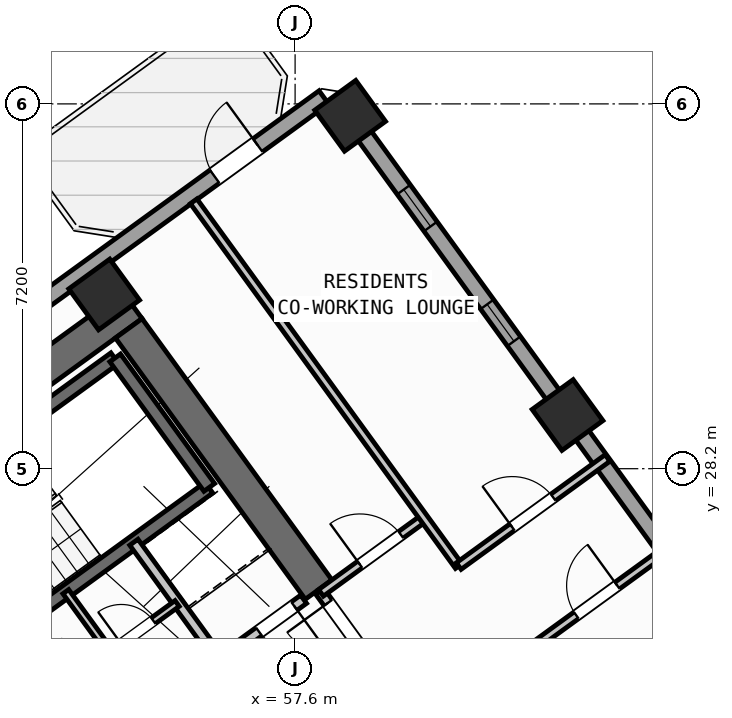
"""IFC4 building model, lengths in metres.
Left out: names, types, materials, properties, quantities, classifications, styles, units other than length and angle.
Written with IfcOpenShell. Run it as: python <this file> out.ifc"""

import sys

from ifc_helpers import new_model, si_unit, direction, frame, frame_2d, origin, origin_2d, place, context, subcontext, project, spatial, rectangle, hollow_rectangle, extrude, source, transform, mapped, element, fill, save


model = new_model("IFC4")
c1 = context("Model", 3, precision=1e-05, world=origin(), true_north=direction((0.0, 1.0)))
c2 = subcontext(c1, "Body", "Model", "MODEL_VIEW")
j1 = project(units=[si_unit("LENGTHUNIT", "METRE"), si_unit("PLANEANGLEUNIT", "RADIAN")], contexts=[c1])
p1 = place(None, origin())
s1 = spatial("IfcSite", under=j1, at=p1, CompositionType="ELEMENT")
p2 = place(p1, origin())
s2 = spatial("IfcBuilding", under=s1, at=p2, CompositionType="ELEMENT")
p3 = place(p2, frame((0.0, 0.0, 67.2)))
s3 = spatial("IfcBuildingStorey", under=s2, at=p3, CompositionType="ELEMENT", Elevation=67.2)
p4 = place(p3, frame((44.325, 24.113, 0.0), z_axis=(0.0, 0.0, 1.0), x_axis=(0.809012664862, 0.58779121131, 0.0)))
e1 = element("IfcWall", 1, at=p4, inside=s3, PredefinedType="SHEAR", context=c2, shape_type="SweptSolid", body=[
    extrude(rectangle(XDim=12.44, YDim=0.65, at=frame_2d((6.22, 0.0))), origin(), (0.0, 0.0, 1.0), 4.22),
])
p5 = place(p3, frame((58.064, 25.813, 0.0), z_axis=(0.0, 0.0, 1.0), x_axis=(-0.58777996584, 0.809020835181, 0.0)))
e2 = element("IfcWall", 2, at=p5, inside=s3, PredefinedType="SHEAR", context=c2, shape_type="SweptSolid", body=[
    extrude(rectangle(XDim=6.375, YDim=0.65, at=frame_2d((3.188, 0.0))), origin(), (0.0, 0.0, 1.0), 4.22),
])
m1 = source(origin(), c2, "Body", "SweptSolid", [
    extrude(hollow_rectangle(XDim=1.0, YDim=1.0, WallThickness=0.04, at=origin_2d()), origin(), (0.0, 0.0, 1.0), 4.5),
])
for number, where, z_axis, x_axis in (
    (3, (53.832, 31.638, 0.0), (0.0, 0.0, 1.0), (0.809, 0.588, 0.0)),
    (4, (62.977, 29.259, 0.0), (0.0, 0.0, 1.0), (0.809, 0.588, 0.0)),
    (5, (58.686, 35.165, 0.0), (0.0, 0.0, 1.0), (0.809, 0.588, 0.0)),
):
    element("IfcColumn", number, at=place(p3, frame(where, z_axis=z_axis, x_axis=x_axis)), inside=s3, PredefinedType="COLUMN", context=c2, shape_type="MappedRepresentation", body=[
        mapped(m1, transform((0.0, 0.0, 0.0), scale=1.0)),
    ])
p6 = place(p3, frame((43.938, 25.192, 0.0), z_axis=(0.0, 0.0, 1.0), x_axis=(0.809016324578, 0.587786174187, 0.0)))
e6 = element("IfcWall", 6, at=p6, inside=s3, PredefinedType="STANDARD", context=c2, shape_type="SweptSolid", body=[
    extrude(rectangle(XDim=17.587, YDim=0.32, at=frame_2d((8.794, 0.0))), origin(), (0.0, 0.0, 1.0), 4.22),
])
p7 = place(p6, frame((14.926, 0.0, 0.0)))
e7 = element("IfcOpeningElement", 7, at=p7, cuts=e6, PredefinedType="OPENING", context=c2, shape_type="SweptSolid", body=[
    extrude(rectangle(XDim=1.05, YDim=2.15, at=frame_2d((0.525, 1.075))), frame((0.0, 0.17, 0.0), z_axis=(0.0, -1.0, 0.0), x_axis=(1.0, 0.0, 0.0)), (0.0, 0.0, 1.0), 0.34),
])
p8 = place(p6, frame((2.606, 0.0, 0.8)))
e8 = element("IfcOpeningElement", 8, at=p8, cuts=e6, PredefinedType="OPENING", context=c2, shape_type="SweptSolid", body=[
    extrude(rectangle(XDim=2.1, YDim=1.55, at=frame_2d((1.05, 0.775))), frame((0.0, 0.17, 0.0), z_axis=(0.0, -1.0, 0.0), x_axis=(1.0, 0.0, 0.0)), (0.0, 0.0, 1.0), 0.34),
])
p9 = place(p6, frame((6.881, 0.0, 0.8)))
e9 = element("IfcOpeningElement", 9, at=p9, cuts=e6, PredefinedType="OPENING", context=c2, shape_type="SweptSolid", body=[
    extrude(rectangle(XDim=2.1, YDim=1.55, at=frame_2d((1.05, 0.775))), frame((0.0, 0.17, 0.0), z_axis=(0.0, -1.0, 0.0), x_axis=(1.0, 0.0, 0.0)), (0.0, 0.0, 1.0), 0.34),
])
p10 = place(p3, frame((58.455, 35.484, 0.0), z_axis=(0.0, 0.0, 1.0), x_axis=(0.587783625747, -0.809018176127, 0.0)))
e10 = element("IfcWall", 10, at=p10, inside=s3, PredefinedType="STANDARD", context=c2, shape_type="SweptSolid", body=[
    extrude(rectangle(XDim=21.587, YDim=0.32, at=frame_2d((10.794, 0.0))), origin(), (0.0, 0.0, 1.0), 2.395),
])
p11 = place(p10, frame((2.194, 0.0, 1.0)))
e11 = element("IfcOpeningElement", 11, at=p11, cuts=e10, PredefinedType="OPENING", context=c2, shape_type="SweptSolid", body=[
    extrude(rectangle(XDim=0.9, YDim=1.25, at=frame_2d((0.45, 0.625))), frame((0.0, 0.17, 0.0), z_axis=(0.0, -1.0, 0.0), x_axis=(1.0, 0.0, 0.0)), (0.0, 0.0, 1.0), 0.34),
])
p12 = place(p10, frame((4.994, 0.0, 1.0)))
e12 = element("IfcOpeningElement", 12, at=p12, cuts=e10, PredefinedType="OPENING", context=c2, shape_type="SweptSolid", body=[
    extrude(rectangle(XDim=0.9, YDim=1.25, at=frame_2d((0.45, 0.625))), frame((0.0, 0.17, 0.0), z_axis=(0.0, -1.0, 0.0), x_axis=(1.0, 0.0, 0.0)), (0.0, 0.0, 1.0), 0.34),
])
p13 = place(p10, frame((12.384, 0.0, 1.0)))
e13 = element("IfcOpeningElement", 13, at=p13, cuts=e10, PredefinedType="OPENING", context=c2, shape_type="SweptSolid", body=[
    extrude(rectangle(XDim=0.9, YDim=1.25, at=frame_2d((0.45, 0.625))), frame((0.0, 0.17, 0.0), z_axis=(0.0, -1.0, 0.0), x_axis=(1.0, 0.0, 0.0)), (0.0, 0.0, 1.0), 0.34),
])
p14 = place(p10, frame((18.835, 0.0, 1.0)))
e14 = element("IfcOpeningElement", 14, at=p14, cuts=e10, PredefinedType="OPENING", context=c2, shape_type="SweptSolid", body=[
    extrude(rectangle(XDim=0.9, YDim=1.25, at=frame_2d((0.45, 0.625))), frame((0.0, 0.17, 0.0), z_axis=(0.0, -1.0, 0.0), x_axis=(1.0, 0.0, 0.0)), (0.0, 0.0, 1.0), 0.34),
])
p15 = place(p3, frame((48.006, 25.996, 0.0), z_axis=(0.0, 0.0, 1.0), x_axis=(0.80901903764, 0.587782439969, 0.0)))
e15 = element("IfcWall", 15, at=p15, inside=s3, PredefinedType="SHEAR", context=c2, shape_type="SweptSolid", body=[
    extrude(rectangle(XDim=7.46, YDim=0.26, at=frame_2d((3.73, 0.0))), origin(), (0.0, 0.0, 1.0), 4.22),
])
p16 = place(p3, frame((49.863, 23.44, 0.0), z_axis=(0.0, 0.0, 1.0), x_axis=(0.809003474932, 0.587803859759, 0.0)))
e16 = element("IfcWall", 16, at=p16, inside=s3, PredefinedType="SHEAR", context=c2, shape_type="SweptSolid", body=[
    extrude(rectangle(XDim=7.46, YDim=0.26, at=frame_2d((3.73, 0.0))), origin(), (0.0, 0.0, 1.0), 4.22),
])
p17 = place(p16, frame((0.36, 0.0, 0.0)))
e17 = element("IfcOpeningElement", 17, at=p17, cuts=e16, PredefinedType="OPENING", context=c2, shape_type="SweptSolid", body=[
    extrude(rectangle(XDim=0.86, YDim=2.05, at=frame_2d((0.43, 1.025))), frame((0.0, 0.14, 0.0), z_axis=(0.0, -1.0, 0.0), x_axis=(1.0, 0.0, 0.0)), (0.0, 0.0, 1.0), 0.28),
])
p18 = place(p3, frame((55.906, 27.831, 0.0), z_axis=(0.0, 0.0, 1.0), x_axis=(-0.587804123638, 0.809003283204, 0.0)))
e18 = element("IfcWall", 18, at=p18, inside=s3, PredefinedType="SHEAR", context=c2, shape_type="SweptSolid", body=[
    extrude(rectangle(XDim=3.16, YDim=0.26, at=frame_2d((1.58, 0.0))), origin(), (0.0, 0.0, 1.0), 4.22),
])
p19 = place(p3, frame((56.111, 24.419, 0.0), z_axis=(0.0, 0.0, 1.0), x_axis=(-0.58777848983, 0.809021907548, 0.0)))
e19 = element("IfcWall", 19, at=p19, inside=s3, PredefinedType="STANDARD", context=c2, shape_type="SweptSolid", body=[
    extrude(rectangle(XDim=2.88, YDim=0.2, at=frame_2d((1.44, 0.0))), origin(), (0.0, 0.0, 1.0), 4.21),
])
p20 = place(p3, frame((53.425, 22.468, 0.0), z_axis=(0.0, 0.0, 1.0), x_axis=(0.80902705128, 0.587771409902, 0.0)))
e20 = element("IfcWall", 20, at=p20, inside=s3, PredefinedType="STANDARD", context=c2, shape_type="SweptSolid", body=[
    extrude(rectangle(XDim=5.368, YDim=0.2, at=frame_2d((2.684, 0.0))), origin(), (0.0, 0.0, 1.0), 4.21),
])
p21 = place(p20, frame((4.28, 0.0, 0.0)))
e21 = element("IfcOpeningElement", 21, at=p21, cuts=e20, PredefinedType="OPENING", context=c2, shape_type="SweptSolid", body=[
    extrude(rectangle(XDim=0.86, YDim=2.05, at=frame_2d((0.43, 1.025))), frame((0.0, 0.11, 0.0), z_axis=(0.0, -1.0, 0.0), x_axis=(1.0, 0.0, 0.0)), (0.0, 0.0, 1.0), 0.22),
])
p22 = place(p20, frame((0.35, 0.0, 0.0)))
e22 = element("IfcOpeningElement", 22, at=p22, cuts=e20, PredefinedType="OPENING", context=c2, shape_type="SweptSolid", body=[
    extrude(rectangle(XDim=0.86, YDim=2.05, at=frame_2d((0.43, 1.025))), frame((0.0, 0.11, 0.0), z_axis=(0.0, -1.0, 0.0), x_axis=(1.0, 0.0, 0.0)), (0.0, 0.0, 1.0), 0.22),
])
p23 = place(p3, frame((53.945, 24.576, 0.0), z_axis=(0.0, 0.0, 1.0), x_axis=(-0.587897037186, 0.808935766095, 0.0)))
e23 = element("IfcWall", 23, at=p23, inside=s3, PredefinedType="PLUMBINGWALL", context=c2, shape_type="SweptSolid", body=[
    extrude(rectangle(XDim=1.48, YDim=0.14, at=frame_2d((0.74, 0.0))), origin(), (0.0, 0.0, 1.0), 4.21),
])
p24 = place(p3, frame((52.618, 23.612, 0.0), z_axis=(0.0, 0.0, 1.0), x_axis=(0.809009587469, 0.587795446889, 0.0)))
e24 = element("IfcWall", 24, at=p24, inside=s3, PredefinedType="PLUMBINGWALL", context=c2, shape_type="SweptSolid", body=[
    extrude(rectangle(XDim=3.28, YDim=0.14, at=frame_2d((1.64, 0.0))), origin(), (0.0, 0.0, 1.0), 4.21),
])
p25 = place(p24, frame((0.25, 0.0, 0.0)))
e25 = element("IfcOpeningElement", 25, at=p25, cuts=e24, PredefinedType="OPENING", context=c2, shape_type="SweptSolid", body=[
    extrude(rectangle(XDim=0.78, YDim=2.05, at=frame_2d((0.39, 1.025))), frame((0.0, 0.08, 0.0), z_axis=(0.0, -1.0, 0.0), x_axis=(1.0, 0.0, 0.0)), (0.0, 0.0, 1.0), 0.16),
])
p26 = place(p24, frame((1.92, 0.0, 0.0)))
e26 = element("IfcOpeningElement", 26, at=p26, cuts=e24, PredefinedType="OPENING", context=c2, shape_type="SweptSolid", body=[
    extrude(rectangle(XDim=0.78, YDim=2.05, at=frame_2d((0.39, 1.025))), frame((0.0, 0.08, 0.0), z_axis=(0.0, -1.0, 0.0), x_axis=(1.0, 0.0, 0.0)), (0.0, 0.0, 1.0), 0.16),
])
p27 = place(p3, frame((59.827, 23.386, 0.0), z_axis=(0.0, 0.0, 1.0), x_axis=(-0.587803840107, 0.809003489211, 0.0)))
e27 = element("IfcWall", 27, at=p27, inside=s3, PredefinedType="STANDARD", context=c2, shape_type="SweptSolid", body=[
    extrude(rectangle(XDim=2.96, YDim=0.2, at=frame_2d((1.48, 0.0))), origin(), (0.0, 0.0, 1.0), 2.395),
])
p28 = place(p27, frame((1.68, 0.0, 0.0)))
e28 = element("IfcOpeningElement", 28, at=p28, cuts=e27, PredefinedType="OPENING", context=c2, shape_type="SweptSolid", body=[
    extrude(rectangle(XDim=1.0, YDim=2.1, at=frame_2d((0.5, 1.05))), frame((0.0, 0.11, 0.0), z_axis=(0.0, -1.0, 0.0), x_axis=(1.0, 0.0, 0.0)), (0.0, 0.0, 1.0), 0.22),
])
p29 = place(p3, frame((58.111, 25.749, 0.0), z_axis=(0.0, 0.0, 1.0), x_axis=(0.809000999347, 0.58780726693, 0.0)))
e29 = element("IfcWall", 29, at=p29, inside=s3, PredefinedType="PARTITIONING", context=c2, shape_type="SweptSolid", body=[
    extrude(rectangle(XDim=2.51, YDim=0.16, at=frame_2d((1.255, 0.0))), origin(), (0.0, 0.0, 1.0), 3.595),
])
p30 = place(p29, frame((0.95, 0.0, 0.0)))
e30 = element("IfcOpeningElement", 30, at=p30, cuts=e29, PredefinedType="OPENING", context=c2, shape_type="SweptSolid", body=[
    extrude(rectangle(XDim=1.0, YDim=2.1, at=frame_2d((0.5, 1.05))), frame((0.0, 0.09, 0.0), z_axis=(0.0, -1.0, 0.0), x_axis=(1.0, 0.0, 0.0)), (0.0, 0.0, 1.0), 0.18),
])
p31 = place(p3, frame((60.829, 26.278, 0.0), z_axis=(0.0, 0.0, 1.0), x_axis=(-0.587781800813, 0.80901950201, 0.0)))
e31 = element("IfcWall", 31, at=p31, inside=s3, PredefinedType="PARTITIONING", context=c2, shape_type="SweptSolid", body=[
    extrude(rectangle(XDim=8.9, YDim=0.16, at=frame_2d((4.45, 0.0))), origin(), (0.0, 0.0, 1.0), 4.21),
])
p32 = place(p3, frame((62.093, 24.538, 0.0), z_axis=(0.0, 0.0, 1.0), x_axis=(0.809035546126, 0.58775971715, 0.0)))
e32 = element("IfcWall", 32, at=p32, inside=s3, PredefinedType="PARTITIONING", context=c2, shape_type="SweptSolid", body=[
    extrude(rectangle(XDim=3.63, YDim=0.16, at=frame_2d((1.815, 0.0))), origin(), (0.0, 0.0, 1.0), 4.21),
])
p33 = place(p32, frame((1.305, 0.0, 0.0)))
e33 = element("IfcOpeningElement", 33, at=p33, cuts=e32, PredefinedType="OPENING", context=c2, shape_type="SweptSolid", body=[
    extrude(rectangle(XDim=1.0, YDim=2.1, at=frame_2d((0.5, 1.05))), frame((0.0, 0.09, 0.0), z_axis=(0.0, -1.0, 0.0), x_axis=(1.0, 0.0, 0.0)), (0.0, 0.0, 1.0), 0.18),
])
p34 = place(p3, frame((60.829, 26.278, 0.0), z_axis=(0.0, 0.0, 1.0), x_axis=(0.809003564202, 0.587803736896, 0.0)))
e34 = element("IfcWall", 34, at=p34, inside=s3, PredefinedType="PARTITIONING", context=c2, shape_type="SweptSolid", body=[
    extrude(rectangle(XDim=3.63, YDim=0.16, at=frame_2d((1.815, 0.0))), origin(), (0.0, 0.0, 1.0), 4.21),
])
p35 = place(p34, frame((1.305, 0.0, 0.0)))
e35 = element("IfcOpeningElement", 35, at=p35, cuts=e34, PredefinedType="OPENING", context=c2, shape_type="SweptSolid", body=[
    extrude(rectangle(XDim=1.0, YDim=2.1, at=frame_2d((0.5, 1.05))), frame((0.0, 0.09, 0.0), z_axis=(0.0, -1.0, 0.0), x_axis=(1.0, 0.0, 0.0)), (0.0, 0.0, 1.0), 0.18),
])
m2 = source(origin(), c2, "Body", "SweptSolid", [
    extrude(rectangle(XDim=1.05, YDim=2.15, at=frame_2d((0.525, 1.075))), frame((0.0, 0.025, 0.0), z_axis=(0.0, -1.0, 0.0), x_axis=(1.0, 0.0, 0.0)), (0.0, 0.0, 1.0), 0.05),
])
p36 = place(p7, origin())
e36 = element("IfcDoor", 36, at=p36, inside=s3, OperationType="SINGLE_SWING_RIGHT", PredefinedType="DOOR", context=c2, shape_type="MappedRepresentation", body=[
    mapped(m2, transform((0.0, 0.0, 0.0), scale=1.0)),
])
fill(e7, e36)
m3 = source(origin(), c2, "Body", "SweptSolid", [
    extrude(rectangle(XDim=0.9, YDim=1.25, at=frame_2d((0.45, 0.625))), frame((0.0, 0.03, 0.0), z_axis=(0.0, -1.0, 0.0), x_axis=(1.0, 0.0, 0.0)), (0.0, 0.0, 1.0), 0.06),
])
p37 = place(p11, origin())
e37 = element("IfcWindow", 37, at=p37, inside=s3, PartitioningType="SINGLE_PANEL", PredefinedType="WINDOW", context=c2, shape_type="MappedRepresentation", body=[
    mapped(m3, transform((0.0, 0.0, 0.0), scale=1.0)),
])
fill(e11, e37)
p38 = place(p12, origin())
e38 = element("IfcWindow", 38, at=p38, inside=s3, PartitioningType="SINGLE_PANEL", PredefinedType="WINDOW", context=c2, shape_type="MappedRepresentation", body=[
    mapped(m3, transform((0.0, 0.0, 0.0), scale=1.0)),
])
fill(e12, e38)
m4 = source(origin(), c2, "Body", "SweptSolid", [
    extrude(rectangle(XDim=0.86, YDim=2.05, at=frame_2d((0.43, 1.025))), frame((0.0, 0.025, 0.0), z_axis=(0.0, -1.0, 0.0), x_axis=(1.0, 0.0, 0.0)), (0.0, 0.0, 1.0), 0.05),
])
p39 = place(p21, frame((0.86, 0.0, 0.0), z_axis=(0.0, 0.0, 1.0), x_axis=(-1.0, 0.0, 0.0)))
e39 = element("IfcDoor", 39, at=p39, inside=s3, OperationType="SINGLE_SWING_LEFT", PredefinedType="DOOR", context=c2, shape_type="MappedRepresentation", body=[
    mapped(m4, transform((0.0, 0.0, 0.0), scale=1.0)),
])
fill(e21, e39)
m5 = source(origin(), c2, "Body", "SweptSolid", [
    extrude(rectangle(XDim=0.78, YDim=2.05, at=frame_2d((0.39, 1.025))), frame((0.0, 0.025, 0.0), z_axis=(0.0, -1.0, 0.0), x_axis=(1.0, 0.0, 0.0)), (0.0, 0.0, 1.0), 0.05),
])
p40 = place(p26, origin())
e40 = element("IfcDoor", 40, at=p40, inside=s3, OperationType="SINGLE_SWING_LEFT", PredefinedType="DOOR", context=c2, shape_type="MappedRepresentation", body=[
    mapped(m5, transform((0.0, 0.0, 0.0), scale=1.0)),
])
fill(e26, e40)
m6 = source(origin(), c2, "Body", "SweptSolid", [
    extrude(rectangle(XDim=1.0, YDim=2.1, at=frame_2d((0.5, 1.05))), frame((0.0, 0.025, 0.0), z_axis=(0.0, -1.0, 0.0), x_axis=(1.0, 0.0, 0.0)), (0.0, 0.0, 1.0), 0.05),
])
p41 = place(p30, origin())
e41 = element("IfcDoor", 41, at=p41, inside=s3, OperationType="SINGLE_SWING_LEFT", PredefinedType="DOOR", context=c2, shape_type="MappedRepresentation", body=[
    mapped(m6, transform((0.0, 0.0, 0.0), scale=1.0)),
])
fill(e30, e41)
p42 = place(p28, origin())
e42 = element("IfcDoor", 42, at=p42, inside=s3, OperationType="SINGLE_SWING_RIGHT", PredefinedType="DOOR", context=c2, shape_type="MappedRepresentation", body=[
    mapped(m6, transform((0.0, 0.0, 0.0), scale=1.0)),
])
fill(e28, e42)
p43 = place(p35, origin())
e43 = element("IfcDoor", 43, at=p43, inside=s3, OperationType="SINGLE_SWING_LEFT", PredefinedType="DOOR", context=c2, shape_type="MappedRepresentation", body=[
    mapped(m6, transform((0.0, 0.0, 0.0), scale=1.0)),
])
fill(e35, e43)
p44 = place(p33, origin())
e44 = element("IfcDoor", 44, at=p44, inside=s3, OperationType="SINGLE_SWING_RIGHT", PredefinedType="DOOR", context=c2, shape_type="MappedRepresentation", body=[
    mapped(m6, transform((0.0, 0.0, 0.0), scale=1.0)),
])
fill(e33, e44)
save(model, sys.argv[1])
